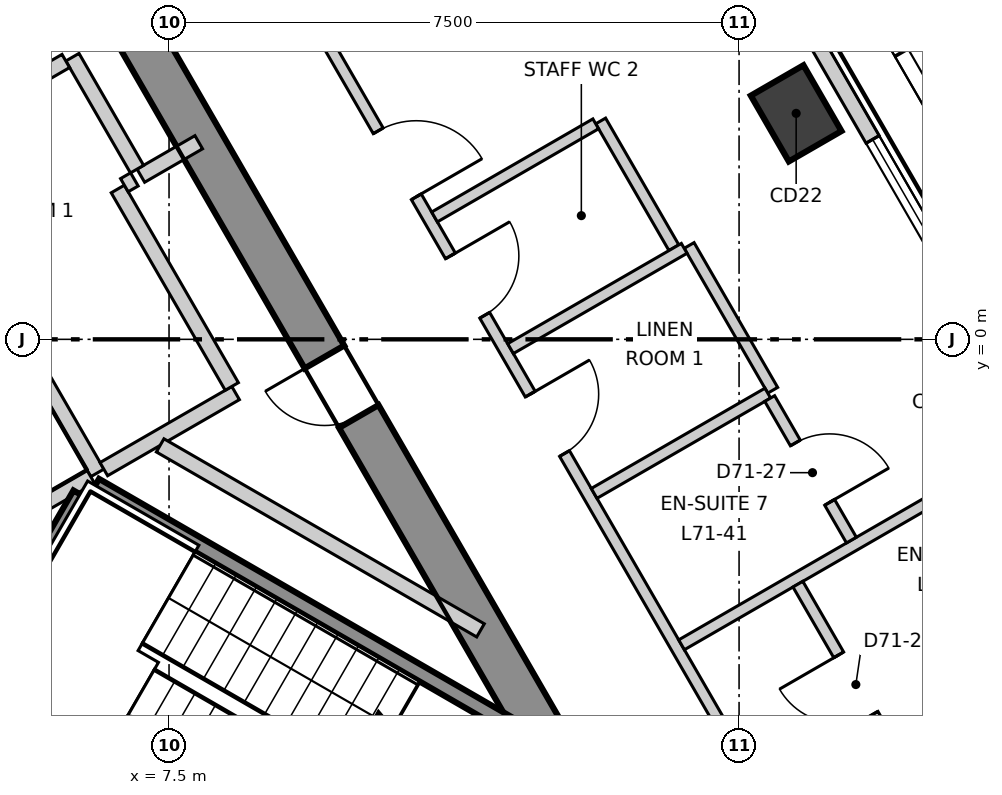
"""IFC4 building model, lengths in metres.
Left out: names, types, materials, properties, quantities, classifications, styles, units other than length and angle.
Written with IfcOpenShell. Run it as: python <this file> out.ifc"""

import sys

from ifc_helpers import new_model, si_unit, direction, frame, frame_2d, origin, origin_2d, place, context, subcontext, project, spatial, polyline, rectangle, outline, extrude, element, fill, save


model = new_model("IFC4")
c1 = context("Model", 3, precision=1e-05, world=origin(), true_north=direction((0.0, 1.0)))
c2 = subcontext(c1, "Body", "Model", "MODEL_VIEW")
j1 = project(units=[si_unit("LENGTHUNIT", "METRE"), si_unit("PLANEANGLEUNIT", "RADIAN")], contexts=[c1])
p1 = place(None, origin())
s1 = spatial("IfcSite", under=j1, at=p1, CompositionType="ELEMENT")
p2 = place(p1, origin())
s2 = spatial("IfcBuilding", under=s1, at=p2, CompositionType="ELEMENT")
p3 = place(p2, frame((0.0, 0.0, 300.7)))
s3 = spatial("IfcBuildingStorey", under=s2, at=p3, CompositionType="ELEMENT", Elevation=300.7)
p4 = place(p3, frame((12.384, -5.15, -0.3), z_axis=(0.0, 0.0, 1.0), x_axis=(-0.500000539815, 0.866025092122, 0.0)))
e1 = element("IfcWall", 1, at=p4, inside=s3, PredefinedType="SHEAR", context=c2, shape_type="SweptSolid", body=[
    extrude(outline(polyline([(-0.173, -0.301), (1.795, -0.301), (3.763, -0.301), (5.731, -0.301), (7.7, -0.301), (9.668, -0.301), (11.636, -0.301), (13.604, -0.3), (15.573, -0.3), (17.541, -0.3), (19.509, -0.3), (21.477, -0.3), (21.131, 0.3), (19.226, 0.3), (17.321, 0.3), (15.415, 0.3), (13.51, 0.3), (11.605, 0.3), (9.699, 0.3), (7.794, 0.3), (5.889, 0.3), (3.984, 0.3), (2.078, 0.3), (0.173, 0.3), (-0.173, -0.301)])), origin(), (0.0, 0.0, 1.0), 3.6),
])
p5 = place(p4, frame((16.328, 0.0, 0.3)))
e2 = element("IfcOpeningElement", 2, at=p5, cuts=e1, PredefinedType="OPENING", context=c2, shape_type="SweptSolid", body=[
    extrude(rectangle(XDim=1.0, YDim=2.1, at=frame_2d((0.5, 1.05))), frame((0.0, 0.31, 0.0), z_axis=(0.0, -1.0, 0.0), x_axis=(1.0, 0.0, 0.0)), (0.0, 0.0, 1.0), 0.621),
])
p6 = place(p4, frame((4.777, 0.0, 0.3)))
e3 = element("IfcOpeningElement", 3, at=p6, cuts=e1, PredefinedType="OPENING", context=c2, shape_type="SweptSolid", body=[
    extrude(rectangle(XDim=0.9, YDim=2.1, at=frame_2d((0.45, 1.05))), frame((0.0, 0.31, 0.0), z_axis=(0.0, -1.0, 0.0), x_axis=(1.0, 0.0, 0.0)), (0.0, 0.0, 1.0), 0.621),
])
p7 = place(p3, frame((15.751, 2.973, -0.3), z_axis=(0.0, 0.0, 1.0), x_axis=(-0.5, 0.866025403784, 0.0)))
e4 = element("IfcColumn", 4, at=p7, inside=s3, PredefinedType="COLUMN", context=c2, shape_type="SweptSolid", body=[
    extrude(rectangle(XDim=1.0, YDim=0.8, at=origin_2d()), origin(), (0.0, 0.0, 1.0), 3.6),
])
p8 = place(p3, frame((24.96, -11.578, 0.0), z_axis=(0.0, 0.0, 1.0), x_axis=(-0.500002391419, 0.866024023094, 0.0)))
e5 = element("IfcWall", 5, at=p8, inside=s3, PredefinedType="ELEMENTEDWALL", context=c2, shape_type="SweptSolid", body=[
    extrude(rectangle(XDim=44.994, YDim=0.2, at=frame_2d((22.497, 0.0))), origin(), (0.0, 0.0, 1.0), 3.3),
])
p9 = place(p8, frame((2.103, 0.0, 0.9)))
e6 = element("IfcOpeningElement", 6, at=p9, cuts=e5, PredefinedType="OPENING", context=c2, shape_type="SweptSolid", body=[
    extrude(rectangle(XDim=3.7, YDim=2.2, at=frame_2d((1.85, 1.1))), frame((0.0, 0.11, 0.0), z_axis=(0.0, -1.0, 0.0), x_axis=(1.0, 0.0, 0.0)), (0.0, 0.0, 1.0), 0.22),
])
p10 = place(p8, frame((7.404, 0.0, 0.9)))
e7 = element("IfcOpeningElement", 7, at=p10, cuts=e5, PredefinedType="OPENING", context=c2, shape_type="SweptSolid", body=[
    extrude(rectangle(XDim=3.7, YDim=2.2, at=frame_2d((1.85, 1.1))), frame((0.0, 0.11, 0.0), z_axis=(0.0, -1.0, 0.0), x_axis=(1.0, 0.0, 0.0)), (0.0, 0.0, 1.0), 0.22),
])
p11 = place(p8, frame((12.705, 0.0, 0.9)))
e8 = element("IfcOpeningElement", 8, at=p11, cuts=e5, PredefinedType="OPENING", context=c2, shape_type="SweptSolid", body=[
    extrude(rectangle(XDim=3.7, YDim=2.2, at=frame_2d((1.85, 1.1))), frame((0.0, 0.11, 0.0), z_axis=(0.0, -1.0, 0.0), x_axis=(1.0, 0.0, 0.0)), (0.0, 0.0, 1.0), 0.22),
])
p12 = place(p8, frame((18.006, 0.0, 0.9)))
e9 = element("IfcOpeningElement", 9, at=p12, cuts=e5, PredefinedType="OPENING", context=c2, shape_type="SweptSolid", body=[
    extrude(rectangle(XDim=3.7, YDim=2.2, at=frame_2d((1.85, 1.1))), frame((0.0, 0.11, 0.0), z_axis=(0.0, -1.0, 0.0), x_axis=(1.0, 0.0, 0.0)), (0.0, 0.0, 1.0), 0.22),
])
p13 = place(p8, frame((23.308, 0.0, 0.9)))
e10 = element("IfcOpeningElement", 10, at=p13, cuts=e5, PredefinedType="OPENING", context=c2, shape_type="SweptSolid", body=[
    extrude(rectangle(XDim=3.7, YDim=2.2, at=frame_2d((1.85, 1.1))), frame((0.0, 0.11, 0.0), z_axis=(0.0, -1.0, 0.0), x_axis=(1.0, 0.0, 0.0)), (0.0, 0.0, 1.0), 0.22),
])
p14 = place(p8, frame((28.609, 0.0, 0.9)))
e11 = element("IfcOpeningElement", 11, at=p14, cuts=e5, PredefinedType="OPENING", context=c2, shape_type="SweptSolid", body=[
    extrude(rectangle(XDim=3.7, YDim=2.2, at=frame_2d((1.85, 1.1))), frame((0.0, 0.11, 0.0), z_axis=(0.0, -1.0, 0.0), x_axis=(1.0, 0.0, 0.0)), (0.0, 0.0, 1.0), 0.22),
])
p15 = place(p8, frame((33.91, 0.0, 0.9)))
e12 = element("IfcOpeningElement", 12, at=p15, cuts=e5, PredefinedType="OPENING", context=c2, shape_type="SweptSolid", body=[
    extrude(rectangle(XDim=3.7, YDim=2.2, at=frame_2d((1.85, 1.1))), frame((0.0, 0.11, 0.0), z_axis=(0.0, -1.0, 0.0), x_axis=(1.0, 0.0, 0.0)), (0.0, 0.0, 1.0), 0.22),
])
p16 = place(p8, frame((39.211, 0.0, 0.9)))
e13 = element("IfcOpeningElement", 13, at=p16, cuts=e5, PredefinedType="OPENING", context=c2, shape_type="SweptSolid", body=[
    extrude(rectangle(XDim=3.7, YDim=2.2, at=frame_2d((1.85, 1.1))), frame((0.0, 0.11, 0.0), z_axis=(0.0, -1.0, 0.0), x_axis=(1.0, 0.0, 0.0)), (0.0, 0.0, 1.0), 0.22),
])
p17 = place(p3, frame((0.075, 20.37, 0.0), z_axis=(0.0, 0.0, 1.0), x_axis=(0.500009775255, -0.866019759965, 0.0)))
e14 = element("IfcWall", 14, at=p17, inside=s3, PredefinedType="PARTITIONING", context=c2, shape_type="SweptSolid", body=[
    extrude(rectangle(XDim=35.207, YDim=0.15, at=frame_2d((17.604, 0.0))), origin(), (0.0, 0.0, 1.0), 3.3),
])
p18 = place(p17, frame((31.307, 0.0, 0.0)))
e15 = element("IfcOpeningElement", 15, at=p18, cuts=e14, PredefinedType="OPENING", context=c2, shape_type="SweptSolid", body=[
    extrude(rectangle(XDim=1.0, YDim=2.1, at=frame_2d((0.5, 1.05))), frame((0.0, 0.085, 0.0), z_axis=(0.0, -1.0, 0.0), x_axis=(1.0, 0.0, 0.0)), (0.0, 0.0, 1.0), 0.17),
])
p19 = place(p17, frame((20.355, 0.0, 0.0)))
e16 = element("IfcOpeningElement", 16, at=p19, cuts=e14, PredefinedType="OPENING", context=c2, shape_type="SweptSolid", body=[
    extrude(rectangle(XDim=1.0, YDim=2.1, at=frame_2d((0.5, 1.05))), frame((0.0, 0.085, 0.0), z_axis=(0.0, -1.0, 0.0), x_axis=(1.0, 0.0, 0.0)), (0.0, 0.0, 1.0), 0.17),
])
p20 = place(p17, frame((24.355, 0.0, 0.0)))
e17 = element("IfcOpeningElement", 17, at=p20, cuts=e14, PredefinedType="OPENING", context=c2, shape_type="SweptSolid", body=[
    extrude(rectangle(XDim=0.9, YDim=2.1, at=frame_2d((0.45, 1.05))), frame((0.0, 0.085, 0.0), z_axis=(0.0, -1.0, 0.0), x_axis=(1.0, 0.0, 0.0)), (0.0, 0.0, 1.0), 0.17),
])
p21 = place(p17, frame((22.255, 0.0, 0.0)))
e18 = element("IfcOpeningElement", 18, at=p21, cuts=e14, PredefinedType="OPENING", context=c2, shape_type="SweptSolid", body=[
    extrude(rectangle(XDim=0.9, YDim=2.1, at=frame_2d((0.45, 1.05))), frame((0.0, 0.085, 0.0), z_axis=(0.0, -1.0, 0.0), x_axis=(1.0, 0.0, 0.0)), (0.0, 0.0, 1.0), 0.17),
])
p22 = place(p17, frame((8.453, 0.0, 0.0)))
e19 = element("IfcOpeningElement", 19, at=p22, cuts=e14, PredefinedType="OPENING", context=c2, shape_type="SweptSolid", body=[
    extrude(rectangle(XDim=1.0, YDim=2.1, at=frame_2d((0.5, 1.05))), frame((0.0, 0.085, 0.0), z_axis=(0.0, -1.0, 0.0), x_axis=(1.0, 0.0, 0.0)), (0.0, 0.0, 1.0), 0.17),
])
p23 = place(p17, frame((13.753, 0.0, 0.0)))
e20 = element("IfcOpeningElement", 20, at=p23, cuts=e14, PredefinedType="OPENING", context=c2, shape_type="SweptSolid", body=[
    extrude(rectangle(XDim=0.9, YDim=2.1, at=frame_2d((0.45, 1.05))), frame((0.0, 0.085, 0.0), z_axis=(0.0, -1.0, 0.0), x_axis=(1.0, 0.0, 0.0)), (0.0, 0.0, 1.0), 0.17),
])
p24 = place(p17, frame((11.553, 0.0, 0.0)))
e21 = element("IfcOpeningElement", 21, at=p24, cuts=e14, PredefinedType="OPENING", context=c2, shape_type="SweptSolid", body=[
    extrude(rectangle(XDim=0.9, YDim=2.1, at=frame_2d((0.45, 1.05))), frame((0.0, 0.085, 0.0), z_axis=(0.0, -1.0, 0.0), x_axis=(1.0, 0.0, 0.0)), (0.0, 0.0, 1.0), 0.17),
])
p25 = place(p17, frame((2.951, 0.0, 0.0)))
e22 = element("IfcOpeningElement", 22, at=p25, cuts=e14, PredefinedType="OPENING", context=c2, shape_type="SweptSolid", body=[
    extrude(rectangle(XDim=1.0, YDim=2.1, at=frame_2d((0.5, 1.05))), frame((0.0, 0.085, 0.0), z_axis=(0.0, -1.0, 0.0), x_axis=(1.0, 0.0, 0.0)), (0.0, 0.0, 1.0), 0.17),
])
p26 = place(p3, frame((14.343, 1.235, 0.0), z_axis=(0.0, 0.0, 1.0), x_axis=(0.500077893725, -0.86598042715, 0.0)))
e23 = element("IfcWall", 23, at=p26, inside=s3, PredefinedType="PARTITIONING", context=c2, shape_type="SweptSolid", body=[
    extrude(rectangle(XDim=2.2, YDim=0.15, at=frame_2d((1.1, 0.0))), origin(), (0.0, 0.0, 1.0), 3.3),
])
p27 = place(p3, frame((13.179, 2.873, 0.0), z_axis=(0.0, 0.0, 1.0), x_axis=(0.500271259635, -0.865868735308, 0.0)))
e24 = element("IfcWall", 24, at=p27, inside=s3, PredefinedType="PARTITIONING", context=c2, shape_type="SweptSolid", body=[
    extrude(rectangle(XDim=1.925, YDim=0.15, at=frame_2d((0.963, 0.0))), origin(), (0.0, 0.0, 1.0), 3.3),
])
p28 = place(p3, frame((10.993, 1.61, 0.0), z_axis=(0.0, 0.0, 1.0), x_axis=(0.865983065851, 0.500073324283, 0.0)))
e25 = element("IfcWall", 25, at=p28, inside=s3, PredefinedType="PARTITIONING", context=c2, shape_type="SweptSolid", body=[
    extrude(rectangle(XDim=2.449, YDim=0.15, at=frame_2d((1.225, 0.0))), origin(), (0.0, 0.0, 1.0), 3.3),
])
for number, where, z_axis, x_axis in (
    (26, (11.993, -0.122, 0.0), (0.0, 0.0, 1.0), (0.866, 0.5, 0.0)),
    (27, (13.093, -2.027, 0.0), (0.0, 0.0, 1.0), (0.866, 0.5, 0.0)),
):
    element("IfcWall", number, at=place(p3, frame(where, z_axis=z_axis, x_axis=x_axis)), inside=s3, PredefinedType="PARTITIONING", context=c2, shape_type="SweptSolid", body=[
        extrude(rectangle(XDim=2.638, YDim=0.15, at=frame_2d((1.319, 0.0))), origin(), (0.0, 0.0, 1.0), 3.3),
    ])
p29 = place(p3, frame((14.243, -4.019, 0.0), z_axis=(0.0, 0.0, 1.0), x_axis=(0.866006352826, 0.500032995777, 0.0)))
e28 = element("IfcWall", 28, at=p29, inside=s3, PredefinedType="PARTITIONING", context=c2, shape_type="SweptSolid", body=[
    extrude(rectangle(XDim=5.422, YDim=0.15, at=frame_2d((2.711, 0.0))), origin(), (0.0, 0.0, 1.0), 3.3),
])
p30 = place(p3, frame((15.774, -3.221, 0.0), z_axis=(0.0, 0.0, 1.0), x_axis=(0.499898410332, -0.866084048662, 0.0)))
e29 = element("IfcWall", 29, at=p30, inside=s3, PredefinedType="PARTITIONING", context=c2, shape_type="SweptSolid", body=[
    extrude(rectangle(XDim=5.525, YDim=0.15, at=frame_2d((2.763, 0.0))), origin(), (0.0, 0.0, 1.0), 3.3),
])
p31 = place(p30, frame((1.075, 0.0, 0.0)))
e30 = element("IfcOpeningElement", 30, at=p31, cuts=e29, PredefinedType="OPENING", context=c2, shape_type="SweptSolid", body=[
    extrude(rectangle(XDim=0.9, YDim=2.1, at=frame_2d((0.45, 1.05))), frame((0.0, 0.085, 0.0), z_axis=(0.0, -1.0, 0.0), x_axis=(1.0, 0.0, 0.0)), (0.0, 0.0, 1.0), 0.17),
])
p32 = place(p3, frame((15.403, -0.779, 0.0), z_axis=(0.0, 0.0, 1.0), x_axis=(0.499961633463, -0.866047553582, 0.0)))
e31 = element("IfcWall", 31, at=p32, inside=s3, PredefinedType="PARTITIONING", context=c2, shape_type="SweptSolid", body=[
    extrude(rectangle(XDim=2.15, YDim=0.15, at=frame_2d((1.075, 0.0))), origin(), (0.0, 0.0, 1.0), 3.3),
])
p33 = place(p32, frame((0.676, 0.0, 0.0)))
e32 = element("IfcOpeningElement", 32, at=p33, cuts=e31, PredefinedType="OPENING", context=c2, shape_type="SweptSolid", body=[
    extrude(rectangle(XDim=0.9, YDim=2.1, at=frame_2d((0.45, 1.05))), frame((0.0, 0.085, 0.0), z_axis=(0.0, -1.0, 0.0), x_axis=(1.0, 0.0, 0.0)), (0.0, 0.0, 1.0), 0.17),
])
p34 = place(p3, frame((17.401, -5.89, 0.0), z_axis=(0.0, 0.0, 1.0), x_axis=(0.866105468975, 0.499861297372, 0.0)))
e33 = element("IfcWall", 33, at=p34, inside=s3, PredefinedType="PARTITIONING", context=c2, shape_type="SweptSolid", body=[
    extrude(rectangle(XDim=2.638, YDim=0.15, at=frame_2d((1.319, 0.0))), origin(), (0.0, 0.0, 1.0), 3.3),
])
p35 = place(p3, frame((1.578, 2.874, 0.0), z_axis=(0.0, 0.0, 1.0), x_axis=(0.866045911672, 0.499964477614, 0.0)))
e34 = element("IfcWall", 34, at=p35, inside=s3, PredefinedType="SOLIDWALL", context=c2, shape_type="SweptSolid", body=[
    extrude(rectangle(XDim=5.327, YDim=0.2, at=frame_2d((2.663, 0.0))), origin(), (0.0, 0.0, 1.0), 3.3),
])
p36 = place(p35, frame((2.496, 0.0, 0.0)))
e35 = element("IfcOpeningElement", 35, at=p36, cuts=e34, PredefinedType="OPENING", context=c2, shape_type="SweptSolid", body=[
    extrude(rectangle(XDim=1.1, YDim=2.1, at=frame_2d((0.55, 1.05))), frame((0.0, 0.11, 0.0), z_axis=(0.0, -1.0, 0.0), x_axis=(1.0, 0.0, 0.0)), (0.0, 0.0, 1.0), 0.22),
])
p37 = place(p3, frame((7.129, 2.153, 0.0), z_axis=(0.0, 0.0, 1.0), x_axis=(0.866083962871, 0.499898558967, 0.0)))
e36 = element("IfcWall", 36, at=p37, inside=s3, PredefinedType="SOLIDWALL", context=c2, shape_type="SweptSolid", body=[
    extrude(rectangle(XDim=0.88, YDim=0.2, at=frame_2d((0.44, 0.0))), origin(), (0.0, 0.0, 1.0), 3.3),
])
p38 = place(p3, frame((5.057, 0.841, 0.0), z_axis=(0.0, 0.0, 1.0), x_axis=(0.499990139034, -0.866031096941, 0.0)))
e37 = element("IfcWall", 37, at=p38, inside=s3, PredefinedType="SOLIDWALL", context=c2, shape_type="SweptSolid", body=[
    extrude(rectangle(XDim=3.0, YDim=0.2, at=frame_2d((1.5, 0.0))), origin(), (0.0, 0.0, 1.0), 3.3),
])
p39 = place(p3, frame((4.9, -2.714, 0.0), z_axis=(0.0, 0.0, 1.0), x_axis=(0.865846928409, 0.500309001083, 0.0)))
e38 = element("IfcWall", 38, at=p39, inside=s3, PredefinedType="SOLIDWALL", context=c2, shape_type="SweptSolid", body=[
    extrude(rectangle(XDim=1.813, YDim=0.2, at=frame_2d((0.907, 0.0))), origin(), (0.0, 0.0, 1.0), 3.3),
])
p40 = place(p3, frame((6.229, 3.712, 0.0), z_axis=(0.0, 0.0, 1.0), x_axis=(0.499875724984, -0.86609714211, 0.0)))
e39 = element("IfcWall", 39, at=p40, inside=s3, PredefinedType="SOLIDWALL", context=c2, shape_type="SweptSolid", body=[
    extrude(rectangle(XDim=1.701, YDim=0.2, at=frame_2d((0.85, 0.0))), origin(), (0.0, 0.0, 1.0), 3.3),
])
p41 = place(p3, frame((2.548, 1.587, 0.0), z_axis=(0.0, 0.0, 1.0), x_axis=(0.866004344652, 0.500036473714, 0.0)))
e40 = element("IfcWall", 40, at=p41, inside=s3, PredefinedType="SOLIDWALL", context=c2, shape_type="SweptSolid", body=[
    extrude(rectangle(XDim=4.15, YDim=0.2, at=frame_2d((2.075, 0.0))), origin(), (0.0, 0.0, 1.0), 3.3),
])
p42 = place(p41, frame((1.675, 0.0, 0.0)))
e41 = element("IfcOpeningElement", 41, at=p42, cuts=e40, PredefinedType="OPENING", context=c2, shape_type="SweptSolid", body=[
    extrude(rectangle(XDim=0.9, YDim=2.1, at=frame_2d((0.45, 1.05))), frame((0.0, 0.11, 0.0), z_axis=(0.0, -1.0, 0.0), x_axis=(1.0, 0.0, 0.0)), (0.0, 0.0, 1.0), 0.22),
])
p43 = place(p3, frame((6.642, -1.708, 0.0), z_axis=(0.0, 0.0, 1.0), x_axis=(0.866043441391, 0.499968756647, 0.0)))
e42 = element("IfcWall", 42, at=p43, inside=s3, PredefinedType="SOLIDWALL", context=c2, shape_type="SweptSolid", body=[
    extrude(rectangle(XDim=2.002, YDim=0.2, at=frame_2d((1.001, 0.0))), origin(), (0.0, 0.0, 1.0), 3.3),
])
p44 = place(p3, frame((6.826, 1.978, 0.0), z_axis=(0.0, 0.0, 1.0), x_axis=(0.499990139034, -0.866031096941, 0.0)))
e43 = element("IfcWall", 43, at=p44, inside=s3, PredefinedType="SOLIDWALL", context=c2, shape_type="SweptSolid", body=[
    extrude(rectangle(XDim=3.0, YDim=0.2, at=frame_2d((1.5, 0.0))), origin(), (0.0, 0.0, 1.0), 3.3),
])
p45 = place(p3, frame((6.912, 2.028, 0.0), z_axis=(0.0, 0.0, 1.0), x_axis=(0.866559367082, 0.499074005857, 0.0)))
e44 = element("IfcWall", 44, at=p45, inside=s3, PredefinedType="SOLIDWALL", context=c2, shape_type="SweptSolid", body=[
    extrude(rectangle(XDim=0.152, YDim=0.2, at=frame_2d((0.076, 0.0))), origin(), (0.0, 0.0, 1.0), 3.3),
])
p46 = place(p3, frame((7.383, -1.395, 0.0), z_axis=(0.0, 0.0, 1.0), x_axis=(0.865968383994, -0.500098748171, 0.0)))
e45 = element("IfcWall", 45, at=p46, inside=s3, PredefinedType="SOLIDWALL", context=c2, shape_type="SweptSolid", body=[
    extrude(rectangle(XDim=4.867, YDim=0.2, at=frame_2d((2.434, 0.0))), origin(), (0.0, 0.0, 1.0), 3.3),
])
p47 = place(p3, frame((4.929, -4.693, 0.0), z_axis=(0.0, 0.0, 1.0), x_axis=(0.866005022404, -0.500035299925, 0.0)))
e46 = element("IfcWall", 46, at=p47, inside=s3, PredefinedType="SOLIDWALL", context=c2, shape_type="SweptSolid", body=[
    extrude(rectangle(XDim=6.665, YDim=0.2, at=frame_2d((3.333, 0.0))), origin(), (0.0, 0.0, 1.0), 3.3),
])
p48 = place(p3, frame((4.929, -4.462, 0.0), z_axis=(0.0, 0.0, 1.0), x_axis=(0.500200581029, 0.865909567298, 0.0)))
e47 = element("IfcWall", 47, at=p48, inside=s3, PredefinedType="SOLIDWALL", context=c2, shape_type="SweptSolid", body=[
    extrude(rectangle(XDim=2.799, YDim=0.2, at=frame_2d((1.399, 0.0))), origin(), (0.0, 0.0, 1.0), 3.3),
])
p49 = place(p3, frame((6.529, -1.922, 0.0), z_axis=(0.0, 0.0, 1.0), x_axis=(0.866068467981, -0.499925403204, 0.0)))
e48 = element("IfcWall", 48, at=p49, inside=s3, PredefinedType="SOLIDWALL", context=c2, shape_type="SweptSolid", body=[
    extrude(rectangle(XDim=6.665, YDim=0.2, at=frame_2d((3.332, 0.0))), origin(), (0.0, 0.0, 1.0), 3.3),
])
p50 = place(p11, origin())
e49 = element("IfcWindow", 49, at=p50, inside=s3, PartitioningType="SINGLE_PANEL", PredefinedType="WINDOW", context=c2, shape_type="SweptSolid", body=[
    extrude(rectangle(XDim=3.7, YDim=2.2, at=frame_2d((1.85, 1.1))), frame((0.0, 0.03, 0.0), z_axis=(0.0, -1.0, 0.0), x_axis=(1.0, 0.0, 0.0)), (0.0, 0.0, 1.0), 0.06),
])
fill(e8, e49)
p51 = place(p31, origin())
e50 = element("IfcDoor", 50, at=p51, inside=s3, OperationType="SINGLE_SWING_LEFT", PredefinedType="DOOR", context=c2, shape_type="SweptSolid", body=[
    extrude(rectangle(XDim=0.9, YDim=2.1, at=frame_2d((0.45, 1.05))), frame((0.0, 0.025, 0.0), z_axis=(0.0, -1.0, 0.0), x_axis=(1.0, 0.0, 0.0)), (0.0, 0.0, 1.0), 0.05),
])
fill(e30, e50)
p52 = place(p19, origin())
e51 = element("IfcDoor", 51, at=p52, inside=s3, OperationType="SINGLE_SWING_LEFT", PredefinedType="DOOR", context=c2, shape_type="SweptSolid", body=[
    extrude(rectangle(XDim=1.0, YDim=2.1, at=frame_2d((0.5, 1.05))), frame((0.0, 0.025, 0.0), z_axis=(0.0, -1.0, 0.0), x_axis=(1.0, 0.0, 0.0)), (0.0, 0.0, 1.0), 0.05),
])
fill(e16, e51)
p53 = place(p33, origin())
e52 = element("IfcDoor", 52, at=p53, inside=s3, OperationType="SINGLE_SWING_LEFT", PredefinedType="DOOR", context=c2, shape_type="SweptSolid", body=[
    extrude(rectangle(XDim=0.9, YDim=2.1, at=frame_2d((0.45, 1.05))), frame((0.0, 0.025, 0.0), z_axis=(0.0, -1.0, 0.0), x_axis=(1.0, 0.0, 0.0)), (0.0, 0.0, 1.0), 0.05),
])
fill(e32, e52)
p54 = place(p20, origin())
e53 = element("IfcDoor", 53, at=p54, inside=s3, OperationType="SINGLE_SWING_RIGHT", PredefinedType="DOOR", context=c2, shape_type="SweptSolid", body=[
    extrude(rectangle(XDim=0.9, YDim=2.1, at=frame_2d((0.45, 1.05))), frame((0.0, 0.025, 0.0), z_axis=(0.0, -1.0, 0.0), x_axis=(1.0, 0.0, 0.0)), (0.0, 0.0, 1.0), 0.05),
])
fill(e17, e53)
p55 = place(p21, origin())
e54 = element("IfcDoor", 54, at=p55, inside=s3, OperationType="SINGLE_SWING_RIGHT", PredefinedType="DOOR", context=c2, shape_type="SweptSolid", body=[
    extrude(rectangle(XDim=0.9, YDim=2.1, at=frame_2d((0.45, 1.05))), frame((0.0, 0.025, 0.0), z_axis=(0.0, -1.0, 0.0), x_axis=(1.0, 0.0, 0.0)), (0.0, 0.0, 1.0), 0.05),
])
fill(e18, e54)
p56 = place(p6, origin())
e55 = element("IfcDoor", 55, at=p56, inside=s3, OperationType="SINGLE_SWING_LEFT", PredefinedType="DOOR", context=c2, shape_type="SweptSolid", body=[
    extrude(rectangle(XDim=0.9, YDim=2.1, at=frame_2d((0.45, 1.05))), frame((0.0, 0.025, 0.0), z_axis=(0.0, -1.0, 0.0), x_axis=(1.0, 0.0, 0.0)), (0.0, 0.0, 1.0), 0.05),
])
fill(e3, e55)
save(model, sys.argv[1])
